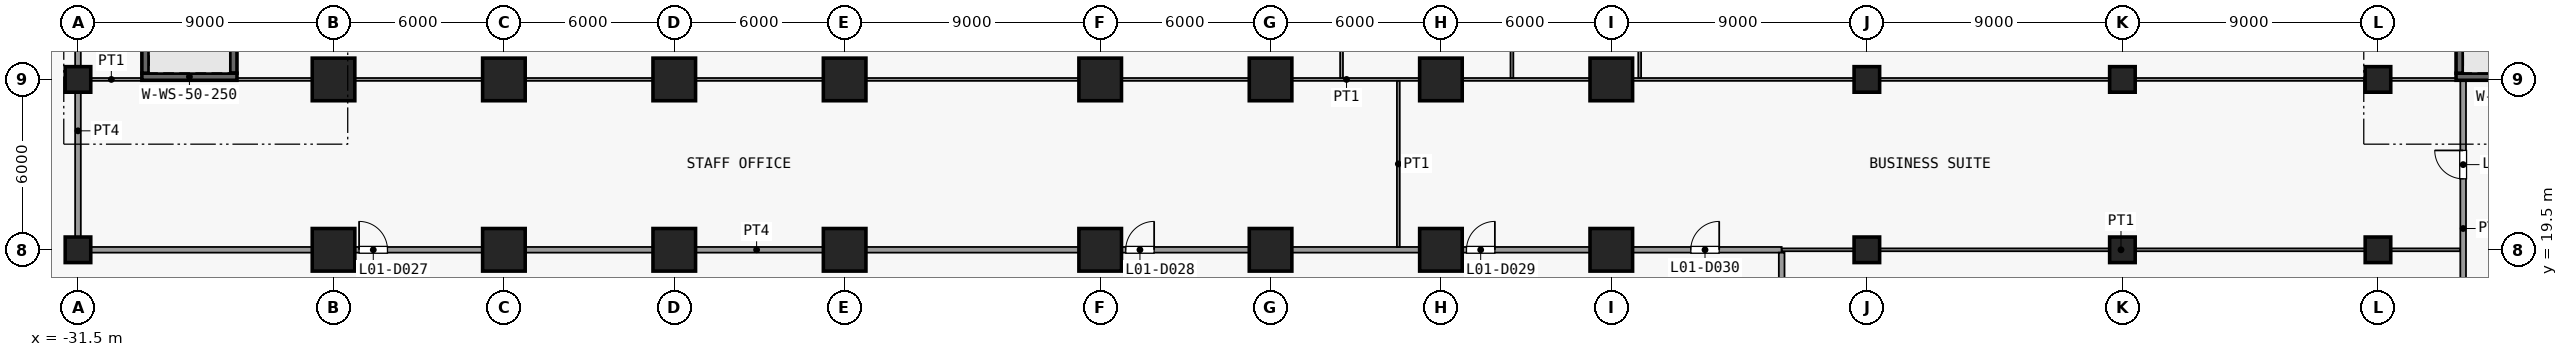
"""IFC4 building model, lengths in metres.
Left out: names, types, materials, properties, quantities, classifications, styles, units other than length and angle.
Written with IfcOpenShell. Run it as: python <this file> out.ifc"""

import sys

from ifc_helpers import new_model, si_unit, direction, frame, frame_2d, origin, origin_2d, place, context, subcontext, project, spatial, rectangle, extrude, element, fill, save


model = new_model("IFC4")
c1 = context("Model", 3, precision=1e-05, world=origin(), true_north=direction((0.0, 1.0)))
c2 = subcontext(c1, "Body", "Model", "MODEL_VIEW")
j1 = project(units=[si_unit("LENGTHUNIT", "METRE"), si_unit("PLANEANGLEUNIT", "RADIAN")], contexts=[c1])
p1 = place(None, origin())
s1 = spatial("IfcSite", under=j1, at=p1, CompositionType="ELEMENT")
p2 = place(p1, origin())
s2 = spatial("IfcBuilding", under=s1, at=p2, CompositionType="ELEMENT")
p3 = place(p2, frame((0.0, 0.0, 8.0)))
s3 = spatial("IfcBuildingStorey", under=s2, at=p3, CompositionType="ELEMENT", Elevation=8.0)
for number, where, z_axis, x_axis in (
    (1, (-31.5, 19.5, 0.0), (0.0, 0.0, 1.0), (1.0, 0.0, 0.0)),
    (2, (-31.5, 25.5, 0.0), (0.0, 0.0, 1.0), (1.0, 0.0, 0.0)),
):
    element("IfcColumn", number, at=place(p3, frame(where, z_axis=z_axis, x_axis=x_axis)), inside=s3, PredefinedType="COLUMN", context=c2, shape_type="SweptSolid", body=[
        extrude(rectangle(XDim=0.9, YDim=0.9, at=origin_2d()), origin(), (0.0, 0.0, 1.0), 5.5),
    ])
for number, where, z_axis, x_axis in (
    (3, (-22.5, 19.5, 0.0), (0.0, 0.0, 1.0), (1.0, 0.0, 0.0)),
    (4, (-22.5, 25.5, 0.0), (0.0, 0.0, 1.0), (1.0, 0.0, 0.0)),
    (5, (-16.5, 19.5, 0.0), (0.0, 0.0, 1.0), (1.0, 0.0, 0.0)),
    (6, (-16.5, 25.5, 0.0), (0.0, 0.0, 1.0), (1.0, 0.0, 0.0)),
    (7, (-10.5, 19.5, 0.0), (0.0, 0.0, 1.0), (1.0, 0.0, 0.0)),
    (8, (-10.5, 25.5, 0.0), (0.0, 0.0, 1.0), (1.0, 0.0, 0.0)),
    (9, (-4.5, 19.5, 0.0), (0.0, 0.0, 1.0), (1.0, 0.0, 0.0)),
    (10, (-4.5, 25.5, 0.0), (0.0, 0.0, 1.0), (1.0, 0.0, 0.0)),
    (11, (4.5, 19.5, 0.0), (0.0, 0.0, 1.0), (1.0, 0.0, 0.0)),
    (12, (4.5, 25.5, 0.0), (0.0, 0.0, 1.0), (1.0, 0.0, 0.0)),
    (13, (10.5, 19.5, 0.0), (0.0, 0.0, 1.0), (1.0, 0.0, 0.0)),
    (14, (10.5, 25.5, 0.0), (0.0, 0.0, 1.0), (1.0, 0.0, 0.0)),
    (15, (16.5, 19.5, 0.0), (0.0, 0.0, 1.0), (1.0, 0.0, 0.0)),
    (16, (16.5, 25.5, 0.0), (0.0, 0.0, 1.0), (1.0, 0.0, 0.0)),
    (17, (22.5, 19.5, 0.0), (0.0, 0.0, 1.0), (1.0, 0.0, 0.0)),
    (18, (22.5, 25.5, 0.0), (0.0, 0.0, 1.0), (1.0, 0.0, 0.0)),
):
    element("IfcColumn", number, at=place(p3, frame(where, z_axis=z_axis, x_axis=x_axis)), inside=s3, PredefinedType="COLUMN", context=c2, shape_type="SweptSolid", body=[
        extrude(rectangle(XDim=1.5, YDim=1.5, at=origin_2d()), origin(), (0.0, 0.0, 1.0), 5.5),
    ])
for number, where, z_axis, x_axis in (
    (19, (31.5, 19.5, 0.0), (0.0, 0.0, 1.0), (1.0, 0.0, 0.0)),
    (20, (31.5, 25.5, 0.0), (0.0, 0.0, 1.0), (1.0, 0.0, 0.0)),
    (21, (40.5, 19.5, 0.0), (0.0, 0.0, 1.0), (1.0, 0.0, 0.0)),
    (22, (40.5, 25.5, 0.0), (0.0, 0.0, 1.0), (1.0, 0.0, 0.0)),
    (23, (49.5, 19.5, 0.0), (0.0, 0.0, 1.0), (1.0, 0.0, 0.0)),
    (24, (49.5, 25.5, 0.0), (0.0, 0.0, 1.0), (1.0, 0.0, 0.0)),
):
    element("IfcColumn", number, at=place(p3, frame(where, z_axis=z_axis, x_axis=x_axis)), inside=s3, PredefinedType="COLUMN", context=c2, shape_type="SweptSolid", body=[
        extrude(rectangle(XDim=0.9, YDim=0.9, at=origin_2d()), origin(), (0.0, 0.0, 1.0), 5.5),
    ])
p4 = place(p3, frame((52.375, 25.72, 0.0), z_axis=(0.0, 0.0, 1.0), x_axis=(0.0, 1.0, 0.0)))
e25 = element("IfcWall", 25, at=p4, inside=s3, PredefinedType="SHEAR", context=c2, shape_type="SweptSolid", body=[
    extrude(rectangle(XDim=1.35, YDim=0.25, at=frame_2d((0.675, 0.0))), origin(), (0.0, 0.0, 1.0), 5.15),
])
p5 = place(p3, frame((52.25, 25.595, 0.0), z_axis=(0.0, 0.0, 1.0), x_axis=(1.0, 0.0, 0.0)))
e26 = element("IfcWall", 26, at=p5, inside=s3, PredefinedType="SHEAR", context=c2, shape_type="SweptSolid", body=[
    extrude(rectangle(XDim=3.35, YDim=0.25, at=frame_2d((1.675, 0.0))), origin(), (0.0, 0.0, 1.0), 5.15),
])
for number, where, z_axis, x_axis in (
    (27, (-29.125, 25.72, 0.0), (0.0, 0.0, 1.0), (0.0, 1.0, 0.0)),
    (28, (-26.025, 25.72, 0.0), (0.0, 0.0, 1.0), (0.0, 1.0, 0.0)),
):
    element("IfcWall", number, at=place(p3, frame(where, z_axis=z_axis, x_axis=x_axis)), inside=s3, PredefinedType="SHEAR", context=c2, shape_type="SweptSolid", body=[
        extrude(rectangle(XDim=1.35, YDim=0.25, at=frame_2d((0.675, 0.0))), origin(), (0.0, 0.0, 1.0), 5.15),
    ])
p6 = place(p3, frame((-29.25, 25.595, 0.0), z_axis=(0.0, 0.0, 1.0), x_axis=(1.0, 0.0, 0.0)))
e29 = element("IfcWall", 29, at=p6, inside=s3, PredefinedType="SHEAR", context=c2, shape_type="SweptSolid", body=[
    extrude(rectangle(XDim=3.35, YDim=0.25, at=frame_2d((1.675, 0.0))), origin(), (0.0, 0.0, 1.0), 5.15),
])
p7 = place(p3, frame((-31.6, 19.5, 0.0), z_axis=(0.0, 0.0, 1.0), x_axis=(1.0, 0.0, 0.0)))
e30 = element("IfcWall", 30, at=p7, inside=s3, PredefinedType="PARTITIONING", context=c2, shape_type="SweptSolid", body=[
    extrude(rectangle(XDim=60.1, YDim=0.2, at=frame_2d((30.05, 0.0))), origin(), (0.0, 0.0, 1.0), 5.15),
])
p8 = place(p7, frame((10.0, 0.0, 0.0)))
e31 = element("IfcOpeningElement", 31, at=p8, cuts=e30, PredefinedType="OPENING", context=c2, shape_type="SweptSolid", body=[
    extrude(rectangle(XDim=1.0, YDim=2.1, at=frame_2d((0.5, 1.05))), frame((0.0, 0.11, 0.0), z_axis=(0.0, -1.0, 0.0), x_axis=(1.0, 0.0, 0.0)), (0.0, 0.0, 1.0), 0.22),
])
p9 = place(p7, frame((37.0, 0.0, 0.0)))
e32 = element("IfcOpeningElement", 32, at=p9, cuts=e30, PredefinedType="OPENING", context=c2, shape_type="SweptSolid", body=[
    extrude(rectangle(XDim=1.0, YDim=2.1, at=frame_2d((0.5, 1.05))), frame((0.0, 0.11, 0.0), z_axis=(0.0, -1.0, 0.0), x_axis=(1.0, 0.0, 0.0)), (0.0, 0.0, 1.0), 0.22),
])
p10 = place(p7, frame((49.0, 0.0, 0.0)))
e33 = element("IfcOpeningElement", 33, at=p10, cuts=e30, PredefinedType="OPENING", context=c2, shape_type="SweptSolid", body=[
    extrude(rectangle(XDim=1.0, YDim=2.1, at=frame_2d((0.5, 1.05))), frame((0.0, 0.11, 0.0), z_axis=(0.0, -1.0, 0.0), x_axis=(1.0, 0.0, 0.0)), (0.0, 0.0, 1.0), 0.22),
])
p11 = place(p7, frame((56.9, 0.0, 0.0)))
e34 = element("IfcOpeningElement", 34, at=p11, cuts=e30, PredefinedType="OPENING", context=c2, shape_type="SweptSolid", body=[
    extrude(rectangle(XDim=1.0, YDim=2.1, at=frame_2d((0.5, 1.05))), frame((0.0, 0.11, 0.0), z_axis=(0.0, -1.0, 0.0), x_axis=(1.0, 0.0, 0.0)), (0.0, 0.0, 1.0), 0.22),
])
p12 = place(p3, frame((28.5, 19.5, 0.0), z_axis=(0.0, 0.0, 1.0), x_axis=(1.0, 0.0, 0.0)))
e35 = element("IfcWall", 35, at=p12, inside=s3, PredefinedType="PARTITIONING", context=c2, shape_type="SweptSolid", body=[
    extrude(rectangle(XDim=23.9, YDim=0.1, at=frame_2d((11.95, 0.0))), origin(), (0.0, 0.0, 1.0), 5.15),
])
p13 = place(p3, frame((-31.4, 25.5, 0.0), z_axis=(0.0, 0.0, 1.0), x_axis=(1.0, 0.0, 0.0)))
e36 = element("IfcWall", 36, at=p13, inside=s3, PredefinedType="PARTITIONING", context=c2, shape_type="SweptSolid", body=[
    extrude(rectangle(XDim=2.15, YDim=0.1, at=frame_2d((1.075, 0.0))), origin(), (0.0, 0.0, 1.0), 5.15),
])
p14 = place(p3, frame((-25.9, 25.5, 0.0), z_axis=(0.0, 0.0, 1.0), x_axis=(1.0, 0.0, 0.0)))
e37 = element("IfcWall", 37, at=p14, inside=s3, PredefinedType="PARTITIONING", context=c2, shape_type="SweptSolid", body=[
    extrude(rectangle(XDim=78.15, YDim=0.1, at=frame_2d((39.075, 0.0))), origin(), (0.0, 0.0, 1.0), 5.15),
])
p15 = place(p3, frame((-31.5, 19.6, 0.0), z_axis=(0.0, 0.0, 1.0), x_axis=(0.0, 1.0, 0.0)))
e38 = element("IfcWall", 38, at=p15, inside=s3, PredefinedType="PARTITIONING", context=c2, shape_type="SweptSolid", body=[
    extrude(rectangle(XDim=11.8, YDim=0.2, at=frame_2d((5.9, 0.0))), origin(), (0.0, 0.0, 1.0), 5.15),
])
p16 = place(p15, frame((8.3, 0.0, 0.0)))
e39 = element("IfcOpeningElement", 39, at=p16, cuts=e38, PredefinedType="OPENING", context=c2, shape_type="SweptSolid", body=[
    extrude(rectangle(XDim=1.0, YDim=2.1, at=frame_2d((0.5, 1.05))), frame((0.0, 0.11, 0.0), z_axis=(0.0, -1.0, 0.0), x_axis=(1.0, 0.0, 0.0)), (0.0, 0.0, 1.0), 0.22),
])
for number, where, z_axis, x_axis in (
    (40, (13.0, 25.55, 0.0), (0.0, 0.0, 1.0), (0.0, 1.0, 0.0)),
    (41, (15.0, 19.6, 0.0), (0.0, 0.0, 1.0), (0.0, 1.0, 0.0)),
    (42, (19.0, 25.55, 0.0), (0.0, 0.0, 1.0), (0.0, 1.0, 0.0)),
    (43, (23.5, 25.55, 0.0), (0.0, 0.0, 1.0), (0.0, 1.0, 0.0)),
):
    element("IfcWall", number, at=place(p3, frame(where, z_axis=z_axis, x_axis=x_axis)), inside=s3, PredefinedType="PARTITIONING", context=c2, shape_type="SweptSolid", body=[
        extrude(rectangle(XDim=5.85, YDim=0.1, at=frame_2d((2.925, 0.0))), origin(), (0.0, 0.0, 1.0), 5.15),
    ])
p17 = place(p3, frame((28.5, 16.6, 0.0), z_axis=(0.0, 0.0, 1.0), x_axis=(0.0, 1.0, 0.0)))
e44 = element("IfcWall", 44, at=p17, inside=s3, PredefinedType="PARTITIONING", context=c2, shape_type="SweptSolid", body=[
    extrude(rectangle(XDim=2.8, YDim=0.2, at=frame_2d((1.4, 0.0))), origin(), (0.0, 0.0, 1.0), 5.15),
])
p18 = place(p3, frame((52.5, 16.6, 0.0), z_axis=(0.0, 0.0, 1.0), x_axis=(0.0, 1.0, 0.0)))
e45 = element("IfcWall", 45, at=p18, inside=s3, PredefinedType="PARTITIONING", context=c2, shape_type="SweptSolid", body=[
    extrude(rectangle(XDim=8.87, YDim=0.2, at=frame_2d((4.435, 0.0))), origin(), (0.0, 0.0, 1.0), 5.15),
])
p19 = place(p18, frame((0.9, 0.0, 0.0)))
e46 = element("IfcOpeningElement", 46, at=p19, cuts=e45, PredefinedType="OPENING", context=c2, shape_type="SweptSolid", body=[
    extrude(rectangle(XDim=1.0, YDim=2.1, at=frame_2d((0.5, 1.05))), frame((0.0, 0.11, 0.0), z_axis=(0.0, -1.0, 0.0), x_axis=(1.0, 0.0, 0.0)), (0.0, 0.0, 1.0), 0.22),
])
p20 = place(p18, frame((5.4, 0.0, 0.0)))
e47 = element("IfcOpeningElement", 47, at=p20, cuts=e45, PredefinedType="OPENING", context=c2, shape_type="SweptSolid", body=[
    extrude(rectangle(XDim=1.0, YDim=2.1, at=frame_2d((0.5, 1.05))), frame((0.0, 0.11, 0.0), z_axis=(0.0, -1.0, 0.0), x_axis=(1.0, 0.0, 0.0)), (0.0, 0.0, 1.0), 0.22),
])
p21 = place(p8, origin())
e48 = element("IfcDoor", 48, at=p21, inside=s3, OperationType="SINGLE_SWING_RIGHT", PredefinedType="DOOR", context=c2, shape_type="SweptSolid", body=[
    extrude(rectangle(XDim=1.0, YDim=2.1, at=frame_2d((0.5, 1.05))), frame((0.0, 0.025, 0.0), z_axis=(0.0, -1.0, 0.0), x_axis=(1.0, 0.0, 0.0)), (0.0, 0.0, 1.0), 0.05),
])
fill(e31, e48)
p22 = place(p9, origin())
e49 = element("IfcDoor", 49, at=p22, inside=s3, OperationType="SINGLE_SWING_LEFT", PredefinedType="DOOR", context=c2, shape_type="SweptSolid", body=[
    extrude(rectangle(XDim=1.0, YDim=2.1, at=frame_2d((0.5, 1.05))), frame((0.0, 0.025, 0.0), z_axis=(0.0, -1.0, 0.0), x_axis=(1.0, 0.0, 0.0)), (0.0, 0.0, 1.0), 0.05),
])
fill(e32, e49)
p23 = place(p10, origin())
e50 = element("IfcDoor", 50, at=p23, inside=s3, OperationType="SINGLE_SWING_LEFT", PredefinedType="DOOR", context=c2, shape_type="SweptSolid", body=[
    extrude(rectangle(XDim=1.0, YDim=2.1, at=frame_2d((0.5, 1.05))), frame((0.0, 0.025, 0.0), z_axis=(0.0, -1.0, 0.0), x_axis=(1.0, 0.0, 0.0)), (0.0, 0.0, 1.0), 0.05),
])
fill(e33, e50)
p24 = place(p11, origin())
e51 = element("IfcDoor", 51, at=p24, inside=s3, OperationType="SINGLE_SWING_LEFT", PredefinedType="DOOR", context=c2, shape_type="SweptSolid", body=[
    extrude(rectangle(XDim=1.0, YDim=2.1, at=frame_2d((0.5, 1.05))), frame((0.0, 0.025, 0.0), z_axis=(0.0, -1.0, 0.0), x_axis=(1.0, 0.0, 0.0)), (0.0, 0.0, 1.0), 0.05),
])
fill(e34, e51)
p25 = place(p20, origin())
e52 = element("IfcDoor", 52, at=p25, inside=s3, OperationType="SINGLE_SWING_LEFT", PredefinedType="DOOR", context=c2, shape_type="SweptSolid", body=[
    extrude(rectangle(XDim=1.0, YDim=2.1, at=frame_2d((0.5, 1.05))), frame((0.0, 0.025, 0.0), z_axis=(0.0, -1.0, 0.0), x_axis=(1.0, 0.0, 0.0)), (0.0, 0.0, 1.0), 0.05),
])
fill(e47, e52)
save(model, sys.argv[1])
